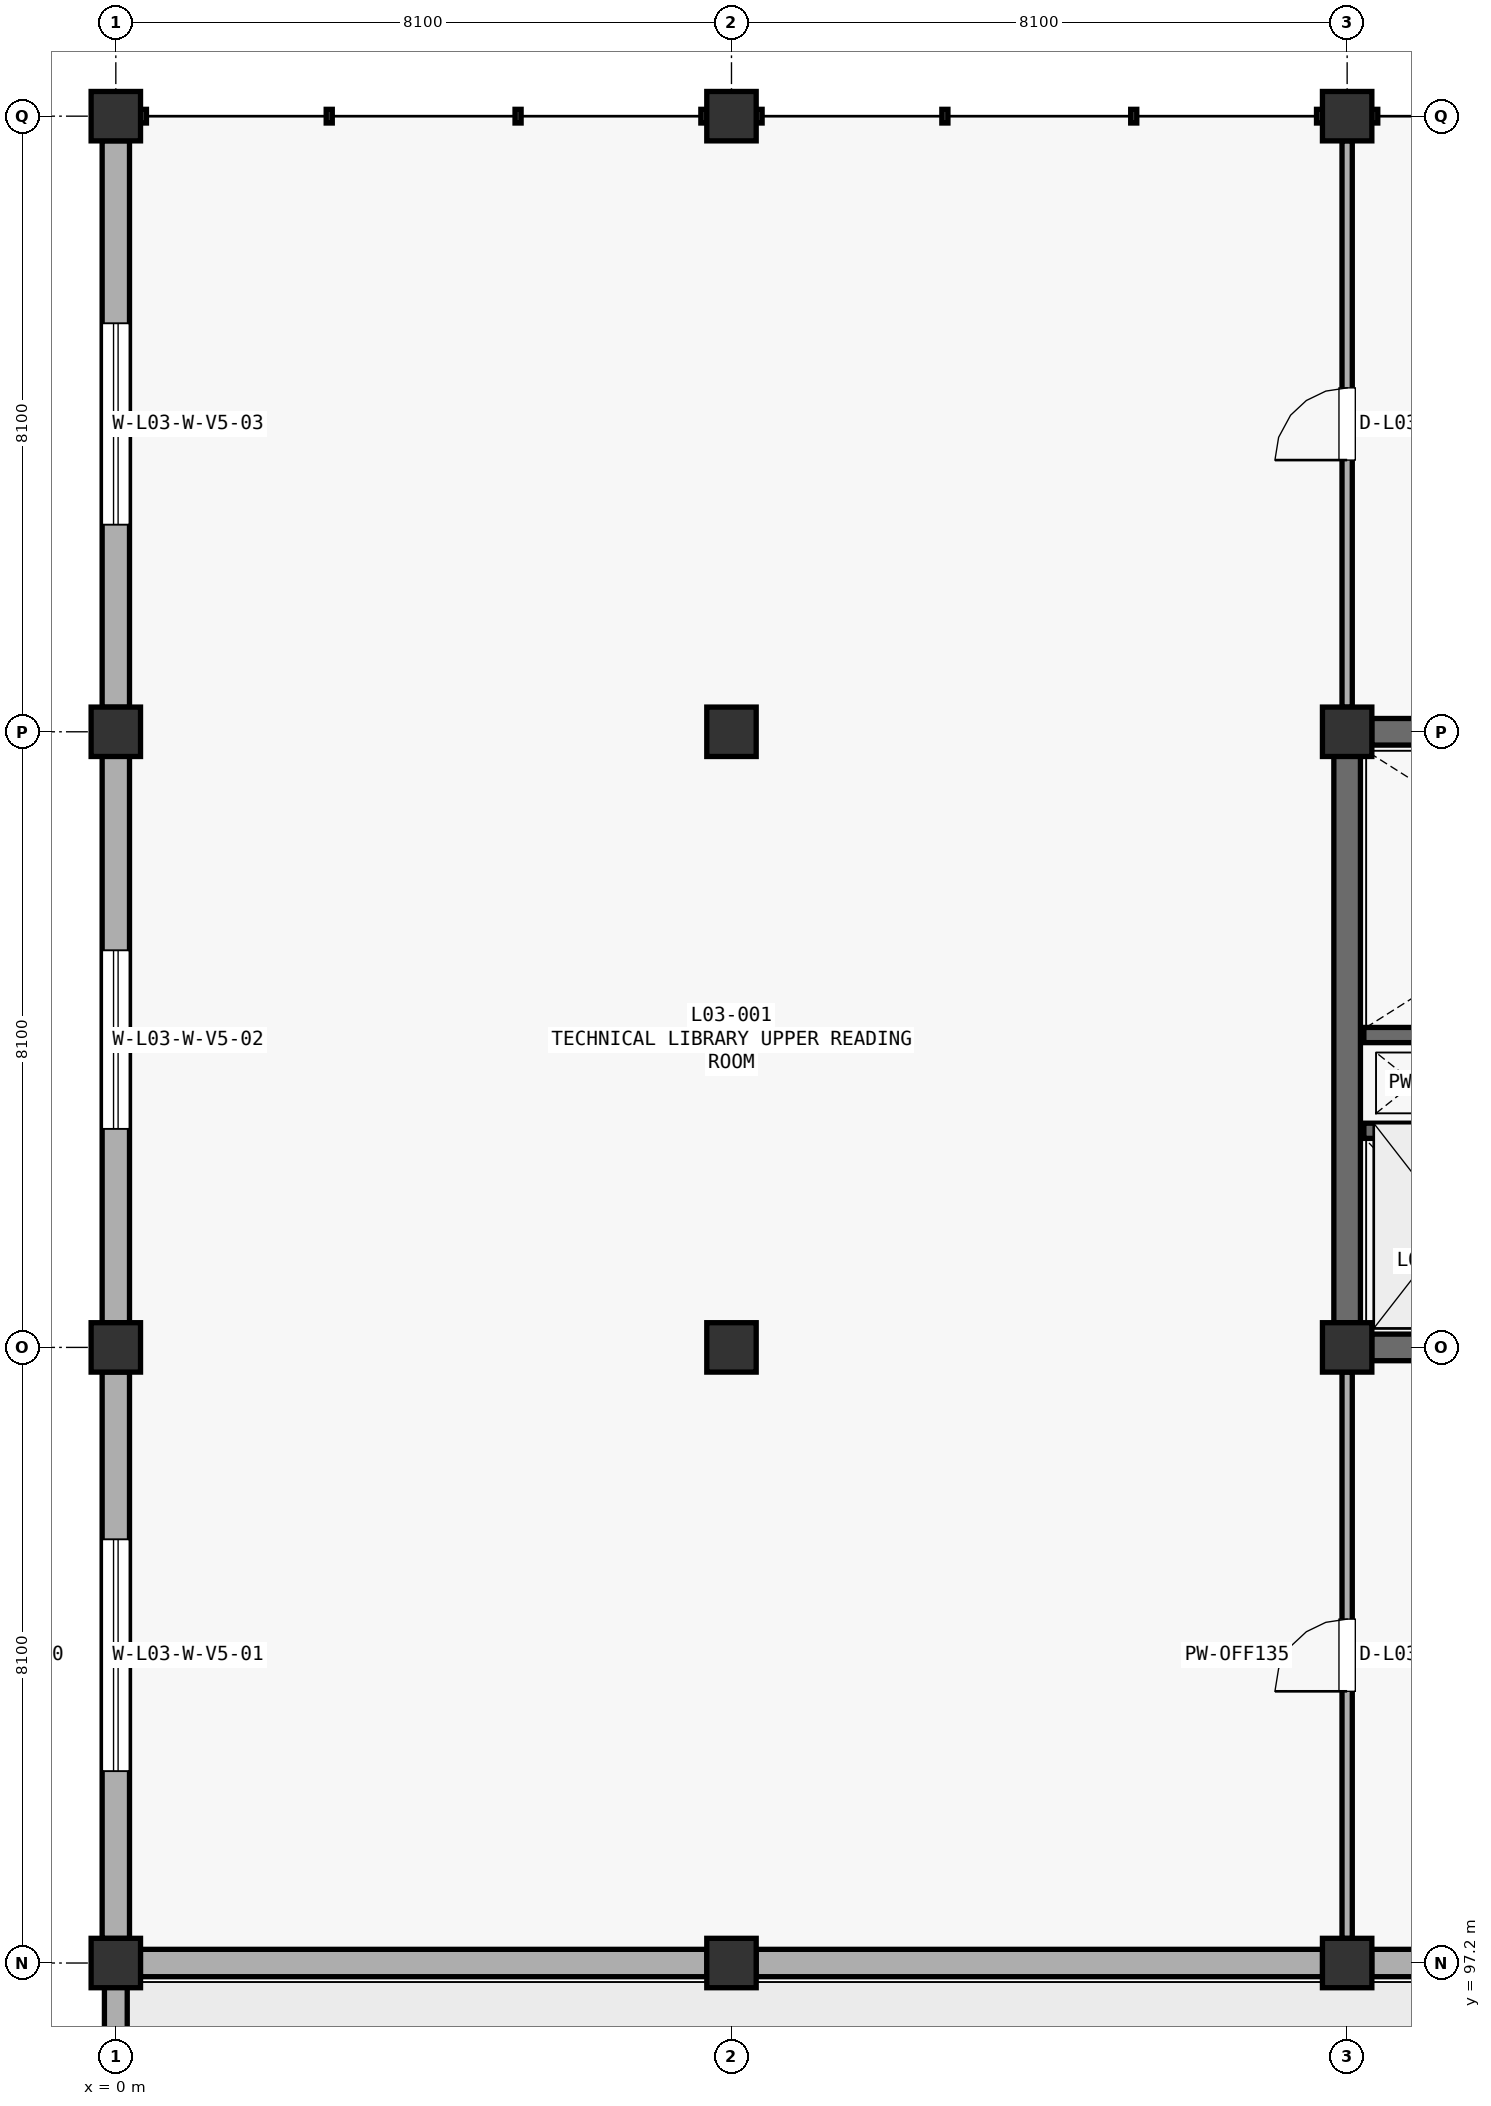
"""IFC4 building model, lengths in metres.
Left out: names, types, materials, properties, quantities, classifications, styles, units other than length and angle.
Written with IfcOpenShell. Run it as: python <this file> out.ifc"""

import sys

from ifc_helpers import new_model, si_unit, direction, frame, frame_2d, origin, origin_2d, place, context, subcontext, project, spatial, rectangle, extrude, element, fill, save


model = new_model("IFC4")
c1 = context("Model", 3, precision=1e-05, world=origin(), true_north=direction((0.0, 1.0)))
c2 = subcontext(c1, "Body", "Model", "MODEL_VIEW")
j1 = project(units=[si_unit("LENGTHUNIT", "METRE"), si_unit("PLANEANGLEUNIT", "RADIAN")], contexts=[c1])
p1 = place(None, origin())
s1 = spatial("IfcSite", under=j1, at=p1, CompositionType="ELEMENT")
p2 = place(p1, origin())
s2 = spatial("IfcBuilding", under=s1, at=p2, CompositionType="ELEMENT")
p3 = place(p2, frame((0.0, 0.0, 14.11)))
s3 = spatial("IfcBuildingStorey", under=s2, at=p3, CompositionType="ELEMENT", Elevation=14.11)
for number, where, z_axis, x_axis in (
    (1, (0.0, 97.2, 0.0), (0.0, 0.0, 1.0), (1.0, 0.0, 0.0)),
    (2, (0.0, 105.3, 0.0), (0.0, 0.0, 1.0), (1.0, 0.0, 0.0)),
    (3, (0.0, 113.4, 0.0), (0.0, 0.0, 1.0), (1.0, 0.0, 0.0)),
    (4, (0.0, 121.5, 0.0), (0.0, 0.0, 1.0), (1.0, 0.0, 0.0)),
    (5, (8.1, 97.2, 0.0), (0.0, 0.0, 1.0), (1.0, 0.0, 0.0)),
    (6, (8.1, 105.3, 0.0), (0.0, 0.0, 1.0), (1.0, 0.0, 0.0)),
    (7, (8.1, 113.4, 0.0), (0.0, 0.0, 1.0), (1.0, 0.0, 0.0)),
    (8, (8.1, 121.5, 0.0), (0.0, 0.0, 1.0), (1.0, 0.0, 0.0)),
    (9, (16.2, 97.2, 0.0), (0.0, 0.0, 1.0), (1.0, 0.0, 0.0)),
    (10, (16.2, 105.3, 0.0), (0.0, 0.0, 1.0), (1.0, 0.0, 0.0)),
    (11, (16.2, 113.4, 0.0), (0.0, 0.0, 1.0), (1.0, 0.0, 0.0)),
    (12, (16.2, 121.5, 0.0), (0.0, 0.0, 1.0), (1.0, 0.0, 0.0)),
):
    element("IfcColumn", number, at=place(p3, frame(where, z_axis=z_axis, x_axis=x_axis)), inside=s3, PredefinedType="COLUMN", context=c2, shape_type="SweptSolid", body=[
        extrude(rectangle(XDim=0.65, YDim=0.65, at=origin_2d()), origin(), (0.0, 0.0, 1.0), 4.42),
    ])
p4 = place(p3, frame((0.0, 97.523, 0.0), z_axis=(0.0, 0.0, 1.0), x_axis=(0.0, 1.0, 0.0)))
e13 = element("IfcWall", 13, at=p4, inside=s3, PredefinedType="STANDARD", context=c2, shape_type="SweptSolid", body=[
    extrude(rectangle(XDim=7.454, YDim=0.36, at=frame_2d((3.727, 0.0))), origin(), (0.0, 0.0, 1.0), 3.857),
])
p5 = place(p4, frame((2.202, 0.0, 0.85)))
e14 = element("IfcOpeningElement", 14, at=p5, cuts=e13, PredefinedType="OPENING", context=c2, shape_type="SweptSolid", body=[
    extrude(rectangle(XDim=3.05, YDim=1.85, at=frame_2d((1.525, 0.925))), frame((0.0, 0.19, 0.0), z_axis=(0.0, -1.0, 0.0), x_axis=(1.0, 0.0, 0.0)), (0.0, 0.0, 1.0), 0.38),
])
p6 = place(p3, frame((0.0, 105.623, 0.0), z_axis=(0.0, 0.0, 1.0), x_axis=(0.0, 1.0, 0.0)))
e15 = element("IfcWall", 15, at=p6, inside=s3, PredefinedType="STANDARD", context=c2, shape_type="SweptSolid", body=[
    extrude(rectangle(XDim=7.454, YDim=0.36, at=frame_2d((3.727, 0.0))), origin(), (0.0, 0.0, 1.0), 3.562),
])
p7 = place(p6, frame((2.552, 0.0, 0.85)))
e16 = element("IfcOpeningElement", 16, at=p7, cuts=e15, PredefinedType="OPENING", context=c2, shape_type="SweptSolid", body=[
    extrude(rectangle(XDim=2.35, YDim=1.8, at=frame_2d((1.175, 0.9))), frame((0.0, 0.19, 0.0), z_axis=(0.0, -1.0, 0.0), x_axis=(1.0, 0.0, 0.0)), (0.0, 0.0, 1.0), 0.38),
])
p8 = place(p3, frame((0.0, 113.723, 0.0), z_axis=(0.0, 0.0, 1.0), x_axis=(0.0, 1.0, 0.0)))
e17 = element("IfcWall", 17, at=p8, inside=s3, PredefinedType="STANDARD", context=c2, shape_type="SweptSolid", body=[
    extrude(rectangle(XDim=7.454, YDim=0.36, at=frame_2d((3.727, 0.0))), origin(), (0.0, 0.0, 1.0), 3.312),
])
p9 = place(p8, frame((2.402, 0.0, 0.85)))
e18 = element("IfcOpeningElement", 18, at=p9, cuts=e17, PredefinedType="OPENING", context=c2, shape_type="SweptSolid", body=[
    extrude(rectangle(XDim=2.65, YDim=1.8, at=frame_2d((1.325, 0.9))), frame((0.0, 0.19, 0.0), z_axis=(0.0, -1.0, 0.0), x_axis=(1.0, 0.0, 0.0)), (0.0, 0.0, 1.0), 0.38),
])
p10 = place(p3, frame((0.323, 97.2, 0.0), z_axis=(0.0, 0.0, 1.0), x_axis=(1.0, 0.0, 0.0)))
e19 = element("IfcWall", 19, at=p10, inside=s3, PredefinedType="STANDARD", context=c2, shape_type="SweptSolid", body=[
    extrude(rectangle(XDim=7.454, YDim=0.36, at=frame_2d((3.727, 0.0))), origin(), (0.0, 0.0, 1.0), 3.747),
])
p11 = place(p3, frame((8.423, 97.2, 0.0), z_axis=(0.0, 0.0, 1.0), x_axis=(1.0, 0.0, 0.0)))
e20 = element("IfcWall", 20, at=p11, inside=s3, PredefinedType="STANDARD", context=c2, shape_type="SweptSolid", body=[
    extrude(rectangle(XDim=7.454, YDim=0.36, at=frame_2d((3.727, 0.0))), origin(), (0.0, 0.0, 1.0), 3.562),
])
p12 = place(p3, frame((16.523, 97.2, 0.0), z_axis=(0.0, 0.0, 1.0), x_axis=(1.0, 0.0, 0.0)))
e21 = element("IfcWall", 21, at=p12, inside=s3, PredefinedType="STANDARD", context=c2, shape_type="SweptSolid", body=[
    extrude(rectangle(XDim=7.454, YDim=0.36, at=frame_2d((3.727, 0.0))), origin(), (0.0, 0.0, 1.0), 3.312),
])
p13 = place(p3, frame((0.0, 89.224, 2.235), z_axis=(0.0, 0.0, 1.0), x_axis=(0.0, 1.0, 0.0)))
e22 = element("IfcWall", 22, at=p13, inside=s3, PredefinedType="STANDARD", context=c2, shape_type="SweptSolid", body=[
    extrude(rectangle(XDim=7.716, YDim=0.3, at=frame_2d((3.858, 0.0))), origin(), (0.0, 0.0, 1.0), 2.39),
])
p14 = place(p3, frame((16.523, 113.4, 0.0), z_axis=(0.0, 0.0, 1.0), x_axis=(1.0, 0.0, 0.0)))
e23 = element("IfcWall", 23, at=p14, inside=s3, PredefinedType="SHEAR", context=c2, shape_type="SweptSolid", body=[
    extrude(rectangle(XDim=7.454, YDim=0.35, at=frame_2d((3.727, 0.0))), origin(), (0.0, 0.0, 1.0), 4.162),
])
p15 = place(p3, frame((16.2, 105.623, 0.0), z_axis=(0.0, 0.0, 1.0), x_axis=(0.0, 1.0, 0.0)))
e24 = element("IfcWall", 24, at=p15, inside=s3, PredefinedType="SHEAR", context=c2, shape_type="SweptSolid", body=[
    extrude(rectangle(XDim=7.454, YDim=0.35, at=frame_2d((3.727, 0.0))), origin(), (0.0, 0.0, 1.0), 4.162),
])
p16 = place(p3, frame((16.523, 105.3, 0.0), z_axis=(0.0, 0.0, 1.0), x_axis=(1.0, 0.0, 0.0)))
e25 = element("IfcWall", 25, at=p16, inside=s3, PredefinedType="SHEAR", context=c2, shape_type="SweptSolid", body=[
    extrude(rectangle(XDim=7.454, YDim=0.35, at=frame_2d((3.727, 0.0))), origin(), (0.0, 0.0, 1.0), 4.162),
])
p17 = place(p16, frame((5.204, 0.0, 0.0)))
e26 = element("IfcOpeningElement", 26, at=p17, cuts=e25, PredefinedType="OPENING", context=c2, shape_type="SweptSolid", body=[
    extrude(rectangle(XDim=1.2, YDim=2.2, at=frame_2d((0.6, 1.1))), frame((0.0, 0.185, 0.0), z_axis=(0.0, -1.0, 0.0), x_axis=(1.0, 0.0, 0.0)), (0.0, 0.0, 1.0), 0.37),
])
p18 = place(p3, frame((16.42, 109.41, 0.0), z_axis=(0.0, 0.0, 1.0), x_axis=(1.0, 0.0, 0.0)))
e27 = element("IfcWall", 27, at=p18, inside=s3, PredefinedType="SHEAR", context=c2, shape_type="SweptSolid", body=[
    extrude(rectangle(XDim=7.66, YDim=0.2, at=frame_2d((3.83, 0.0))), origin(), (0.0, 0.0, 1.0), 4.162),
])
p19 = place(p18, frame((6.11, 0.0, 0.0)))
e28 = element("IfcOpeningElement", 28, at=p19, cuts=e27, PredefinedType="OPENING", context=c2, shape_type="SweptSolid", body=[
    extrude(rectangle(XDim=1.15, YDim=2.2, at=frame_2d((0.575, 1.1))), frame((0.0, 0.11, 0.0), z_axis=(0.0, -1.0, 0.0), x_axis=(1.0, 0.0, 0.0)), (0.0, 0.0, 1.0), 0.22),
])
p20 = place(p3, frame((16.42, 108.15, 0.0), z_axis=(0.0, 0.0, 1.0), x_axis=(1.0, 0.0, 0.0)))
e29 = element("IfcWall", 29, at=p20, inside=s3, PredefinedType="SHEAR", context=c2, shape_type="SweptSolid", body=[
    extrude(rectangle(XDim=2.56, YDim=0.2, at=frame_2d((1.28, 0.0))), origin(), (0.0, 0.0, 1.0), 4.162),
])
p21 = place(p3, frame((16.2, 97.523, 0.0), z_axis=(0.0, 0.0, 1.0), x_axis=(0.0, 1.0, 0.0)))
e30 = element("IfcWall", 30, at=p21, inside=s3, PredefinedType="PARTITIONING", context=c2, shape_type="SweptSolid", body=[
    extrude(rectangle(XDim=7.454, YDim=0.135, at=frame_2d((3.727, 0.0))), origin(), (0.0, 0.0, 1.0), 3.412),
])
p22 = place(p21, frame((3.252, 0.0, 0.0)))
e31 = element("IfcOpeningElement", 31, at=p22, cuts=e30, PredefinedType="OPENING", context=c2, shape_type="SweptSolid", body=[
    extrude(rectangle(XDim=0.95, YDim=2.15, at=frame_2d((0.475, 1.075))), frame((0.0, 0.078, 0.0), z_axis=(0.0, -1.0, 0.0), x_axis=(1.0, 0.0, 0.0)), (0.0, 0.0, 1.0), 0.155),
])
p23 = place(p3, frame((16.2, 113.723, 0.0), z_axis=(0.0, 0.0, 1.0), x_axis=(0.0, 1.0, 0.0)))
e32 = element("IfcWall", 32, at=p23, inside=s3, PredefinedType="PARTITIONING", context=c2, shape_type="SweptSolid", body=[
    extrude(rectangle(XDim=7.454, YDim=0.135, at=frame_2d((3.727, 0.0))), origin(), (0.0, 0.0, 1.0), 3.562),
])
p24 = place(p23, frame((3.252, 0.0, 0.0)))
e33 = element("IfcOpeningElement", 33, at=p24, cuts=e32, PredefinedType="OPENING", context=c2, shape_type="SweptSolid", body=[
    extrude(rectangle(XDim=0.95, YDim=2.15, at=frame_2d((0.475, 1.075))), frame((0.0, 0.078, 0.0), z_axis=(0.0, -1.0, 0.0), x_axis=(1.0, 0.0, 0.0)), (0.0, 0.0, 1.0), 0.155),
])
p25 = place(p5, origin())
e34 = element("IfcWindow", 34, at=p25, inside=s3, PartitioningType="SINGLE_PANEL", PredefinedType="WINDOW", context=c2, shape_type="SweptSolid", body=[
    extrude(rectangle(XDim=3.05, YDim=1.85, at=frame_2d((1.525, 0.925))), frame((0.0, 0.03, 0.0), z_axis=(0.0, -1.0, 0.0), x_axis=(1.0, 0.0, 0.0)), (0.0, 0.0, 1.0), 0.06),
])
fill(e14, e34)
p26 = place(p7, origin())
e35 = element("IfcWindow", 35, at=p26, inside=s3, PartitioningType="SINGLE_PANEL", PredefinedType="WINDOW", context=c2, shape_type="SweptSolid", body=[
    extrude(rectangle(XDim=2.35, YDim=1.8, at=frame_2d((1.175, 0.9))), frame((0.0, 0.03, 0.0), z_axis=(0.0, -1.0, 0.0), x_axis=(1.0, 0.0, 0.0)), (0.0, 0.0, 1.0), 0.06),
])
fill(e16, e35)
p27 = place(p9, origin())
e36 = element("IfcWindow", 36, at=p27, inside=s3, PartitioningType="SINGLE_PANEL", PredefinedType="WINDOW", context=c2, shape_type="SweptSolid", body=[
    extrude(rectangle(XDim=2.65, YDim=1.8, at=frame_2d((1.325, 0.9))), frame((0.0, 0.03, 0.0), z_axis=(0.0, -1.0, 0.0), x_axis=(1.0, 0.0, 0.0)), (0.0, 0.0, 1.0), 0.06),
])
fill(e18, e36)
p28 = place(p22, origin())
e37 = element("IfcDoor", 37, at=p28, inside=s3, OperationType="SINGLE_SWING_LEFT", PredefinedType="DOOR", context=c2, shape_type="SweptSolid", body=[
    extrude(rectangle(XDim=0.95, YDim=2.15, at=frame_2d((0.475, 1.075))), frame((0.0, 0.025, 0.0), z_axis=(0.0, -1.0, 0.0), x_axis=(1.0, 0.0, 0.0)), (0.0, 0.0, 1.0), 0.05),
])
fill(e31, e37)
p29 = place(p24, origin())
e38 = element("IfcDoor", 38, at=p29, inside=s3, OperationType="SINGLE_SWING_LEFT", PredefinedType="DOOR", context=c2, shape_type="SweptSolid", body=[
    extrude(rectangle(XDim=0.95, YDim=2.15, at=frame_2d((0.475, 1.075))), frame((0.0, 0.025, 0.0), z_axis=(0.0, -1.0, 0.0), x_axis=(1.0, 0.0, 0.0)), (0.0, 0.0, 1.0), 0.05),
])
fill(e33, e38)
save(model, sys.argv[1])
